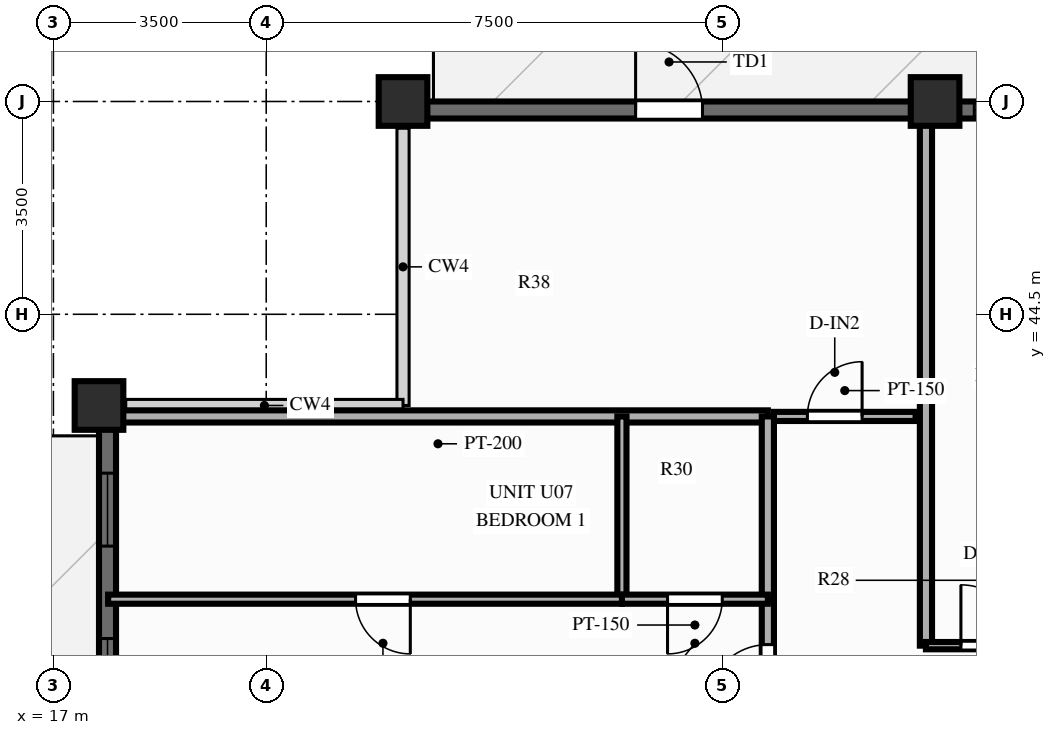
"""IFC4 building model, lengths in metres.
Left out: names, types, materials, properties, quantities, classifications, styles, units other than length and angle.
Written with IfcOpenShell. Run it as: python <this file> out.ifc"""

import sys

from ifc_helpers import new_model, si_unit, direction, frame, frame_2d, origin, origin_2d, place, context, subcontext, project, spatial, rectangle, extrude, source, transform, mapped, element, fill, save


model = new_model("IFC4")
c1 = context("Model", 3, precision=1e-05, world=origin(), true_north=direction((0.0, 1.0)))
c2 = subcontext(c1, "Body", "Model", "MODEL_VIEW")
j1 = project(units=[si_unit("LENGTHUNIT", "METRE"), si_unit("PLANEANGLEUNIT", "RADIAN")], contexts=[c1])
p1 = place(None, origin())
s1 = spatial("IfcSite", under=j1, at=p1, CompositionType="ELEMENT")
p2 = place(p1, origin())
s2 = spatial("IfcBuilding", under=s1, at=p2, CompositionType="ELEMENT")
p3 = place(p2, frame((0.0, 0.0, 186.7)))
s3 = spatial("IfcBuildingStorey", under=s2, at=p3, CompositionType="ELEMENT", Elevation=186.7)
m1 = source(origin(), c2, "Body", "SweptSolid", [
    extrude(rectangle(XDim=0.8, YDim=0.8, at=origin_2d()), origin(), (0.0, 0.0, 1.0), 3.0),
])
for number, where, z_axis, x_axis in (
    (1, (31.5, 48.0, 0.0), (0.0, 0.0, 1.0), (1.0, 0.0, 0.0)),
    (2, (22.75, 48.0, 0.0), (0.0, 0.0, 1.0), (1.0, 0.0, 0.0)),
    (3, (17.75, 43.0, 0.0), (0.0, 0.0, 1.0), (1.0, 0.0, 0.0)),
):
    element("IfcColumn", number, at=place(p3, frame(where, z_axis=z_axis, x_axis=x_axis)), inside=s3, PredefinedType="COLUMN", context=c2, shape_type="MappedRepresentation", body=[
        mapped(m1, transform((0.0, 0.0, 0.0), scale=1.0)),
    ])
p4 = place(p3, frame((22.75, 47.86, 0.0), z_axis=(0.0, 0.0, 1.0), x_axis=(1.0, 0.0, 0.0)))
e4 = element("IfcWall", 4, at=p4, inside=s3, PredefinedType="SOLIDWALL", context=c2, shape_type="SweptSolid", body=[
    extrude(rectangle(XDim=30.5, YDim=0.28, at=frame_2d((15.25, 0.0))), origin(), (0.0, 0.0, 1.0), 2.28),
])
p5 = place(p4, frame((3.825, 0.0, 0.0)))
e5 = element("IfcOpeningElement", 5, at=p5, cuts=e4, PredefinedType="OPENING", context=c2, shape_type="SweptSolid", body=[
    extrude(rectangle(XDim=1.1, YDim=2.15, at=frame_2d((0.55, 1.075))), frame((0.0, 0.152, 0.0), z_axis=(0.0, -1.0, 0.0), x_axis=(1.0, 0.0, 0.0)), (0.0, 0.0, 1.0), 0.304),
])
p6 = place(p4, frame((9.395, 0.0, 0.25)))
e6 = element("IfcOpeningElement", 6, at=p6, cuts=e4, PredefinedType="OPENING", context=c2, shape_type="SweptSolid", body=[
    extrude(rectangle(XDim=0.95, YDim=1.5, at=frame_2d((0.475, 0.75))), frame((0.0, 0.152, 0.0), z_axis=(0.0, -1.0, 0.0), x_axis=(1.0, 0.0, 0.0)), (0.0, 0.0, 1.0), 0.304),
])
p7 = place(p4, frame((11.483, 0.0, 0.25)))
e7 = element("IfcOpeningElement", 7, at=p7, cuts=e4, PredefinedType="OPENING", context=c2, shape_type="SweptSolid", body=[
    extrude(rectangle(XDim=1.2, YDim=1.5, at=frame_2d((0.6, 0.75))), frame((0.0, 0.152, 0.0), z_axis=(0.0, -1.0, 0.0), x_axis=(1.0, 0.0, 0.0)), (0.0, 0.0, 1.0), 0.304),
])
p8 = place(p4, frame((14.383, 0.0, 0.25)))
e8 = element("IfcOpeningElement", 8, at=p8, cuts=e4, PredefinedType="OPENING", context=c2, shape_type="SweptSolid", body=[
    extrude(rectangle(XDim=1.2, YDim=1.5, at=frame_2d((0.6, 0.75))), frame((0.0, 0.152, 0.0), z_axis=(0.0, -1.0, 0.0), x_axis=(1.0, 0.0, 0.0)), (0.0, 0.0, 1.0), 0.304),
])
p9 = place(p4, frame((17.393, 0.0, 0.25)))
e9 = element("IfcOpeningElement", 9, at=p9, cuts=e4, PredefinedType="OPENING", context=c2, shape_type="SweptSolid", body=[
    extrude(rectangle(XDim=1.2, YDim=1.5, at=frame_2d((0.6, 0.75))), frame((0.0, 0.152, 0.0), z_axis=(0.0, -1.0, 0.0), x_axis=(1.0, 0.0, 0.0)), (0.0, 0.0, 1.0), 0.304),
])
p10 = place(p4, frame((19.874, 0.0, 0.25)))
e10 = element("IfcOpeningElement", 10, at=p10, cuts=e4, PredefinedType="OPENING", context=c2, shape_type="SweptSolid", body=[
    extrude(rectangle(XDim=1.2, YDim=1.5, at=frame_2d((0.6, 0.75))), frame((0.0, 0.152, 0.0), z_axis=(0.0, -1.0, 0.0), x_axis=(1.0, 0.0, 0.0)), (0.0, 0.0, 1.0), 0.304),
])
p11 = place(p4, frame((25.525, 0.0, 0.25)))
e11 = element("IfcOpeningElement", 11, at=p11, cuts=e4, PredefinedType="OPENING", context=c2, shape_type="SweptSolid", body=[
    extrude(rectangle(XDim=1.2, YDim=1.5, at=frame_2d((0.6, 0.75))), frame((0.0, 0.152, 0.0), z_axis=(0.0, -1.0, 0.0), x_axis=(1.0, 0.0, 0.0)), (0.0, 0.0, 1.0), 0.304),
])
p12 = place(p3, frame((17.89, 11.0, 0.0), z_axis=(0.0, 0.0, 1.0), x_axis=(0.0, 1.0, 0.0)))
e12 = element("IfcWall", 12, at=p12, inside=s3, PredefinedType="SOLIDWALL", context=c2, shape_type="SweptSolid", body=[
    extrude(rectangle(XDim=32.0, YDim=0.28, at=frame_2d((16.0, 0.0))), origin(), (0.0, 0.0, 1.0), 2.28),
])
p13 = place(p12, frame((0.717, 0.0, 0.25)))
e13 = element("IfcOpeningElement", 13, at=p13, cuts=e12, PredefinedType="OPENING", context=c2, shape_type="SweptSolid", body=[
    extrude(rectangle(XDim=1.2, YDim=1.5, at=frame_2d((0.6, 0.75))), frame((0.0, 0.152, 0.0), z_axis=(0.0, -1.0, 0.0), x_axis=(1.0, 0.0, 0.0)), (0.0, 0.0, 1.0), 0.304),
])
p14 = place(p12, frame((3.139, 0.0, 0.25)))
e14 = element("IfcOpeningElement", 14, at=p14, cuts=e12, PredefinedType="OPENING", context=c2, shape_type="SweptSolid", body=[
    extrude(rectangle(XDim=1.2, YDim=1.5, at=frame_2d((0.6, 0.75))), frame((0.0, 0.152, 0.0), z_axis=(0.0, -1.0, 0.0), x_axis=(1.0, 0.0, 0.0)), (0.0, 0.0, 1.0), 0.304),
])
p15 = place(p12, frame((5.447, 0.0, 0.25)))
e15 = element("IfcOpeningElement", 15, at=p15, cuts=e12, PredefinedType="OPENING", context=c2, shape_type="SweptSolid", body=[
    extrude(rectangle(XDim=0.95, YDim=1.5, at=frame_2d((0.475, 0.75))), frame((0.0, 0.152, 0.0), z_axis=(0.0, -1.0, 0.0), x_axis=(1.0, 0.0, 0.0)), (0.0, 0.0, 1.0), 0.304),
])
p16 = place(p12, frame((8.597, 0.0, 0.25)))
e16 = element("IfcOpeningElement", 16, at=p16, cuts=e12, PredefinedType="OPENING", context=c2, shape_type="SweptSolid", body=[
    extrude(rectangle(XDim=1.2, YDim=1.5, at=frame_2d((0.6, 0.75))), frame((0.0, 0.152, 0.0), z_axis=(0.0, -1.0, 0.0), x_axis=(1.0, 0.0, 0.0)), (0.0, 0.0, 1.0), 0.304),
])
p17 = place(p12, frame((11.05, 0.0, 0.25)))
e17 = element("IfcOpeningElement", 17, at=p17, cuts=e12, PredefinedType="OPENING", context=c2, shape_type="SweptSolid", body=[
    extrude(rectangle(XDim=1.2, YDim=1.5, at=frame_2d((0.6, 0.75))), frame((0.0, 0.152, 0.0), z_axis=(0.0, -1.0, 0.0), x_axis=(1.0, 0.0, 0.0)), (0.0, 0.0, 1.0), 0.304),
])
p18 = place(p12, frame((13.697, 0.0, 0.0)))
e18 = element("IfcOpeningElement", 18, at=p18, cuts=e12, PredefinedType="OPENING", context=c2, shape_type="SweptSolid", body=[
    extrude(rectangle(XDim=1.6, YDim=2.15, at=frame_2d((0.8, 1.075))), frame((0.0, 0.152, 0.0), z_axis=(0.0, -1.0, 0.0), x_axis=(1.0, 0.0, 0.0)), (0.0, 0.0, 1.0), 0.304),
])
p19 = place(p12, frame((16.507, 0.0, 0.25)))
e19 = element("IfcOpeningElement", 19, at=p19, cuts=e12, PredefinedType="OPENING", context=c2, shape_type="SweptSolid", body=[
    extrude(rectangle(XDim=1.2, YDim=1.5, at=frame_2d((0.6, 0.75))), frame((0.0, 0.152, 0.0), z_axis=(0.0, -1.0, 0.0), x_axis=(1.0, 0.0, 0.0)), (0.0, 0.0, 1.0), 0.304),
])
p20 = place(p12, frame((18.959, 0.0, 0.25)))
e20 = element("IfcOpeningElement", 20, at=p20, cuts=e12, PredefinedType="OPENING", context=c2, shape_type="SweptSolid", body=[
    extrude(rectangle(XDim=1.2, YDim=1.5, at=frame_2d((0.6, 0.75))), frame((0.0, 0.152, 0.0), z_axis=(0.0, -1.0, 0.0), x_axis=(1.0, 0.0, 0.0)), (0.0, 0.0, 1.0), 0.304),
])
p21 = place(p12, frame((21.807, 0.0, 0.25)))
e21 = element("IfcOpeningElement", 21, at=p21, cuts=e12, PredefinedType="OPENING", context=c2, shape_type="SweptSolid", body=[
    extrude(rectangle(XDim=1.2, YDim=1.5, at=frame_2d((0.6, 0.75))), frame((0.0, 0.152, 0.0), z_axis=(0.0, -1.0, 0.0), x_axis=(1.0, 0.0, 0.0)), (0.0, 0.0, 1.0), 0.304),
])
p22 = place(p12, frame((26.967, 0.0, 0.25)))
e22 = element("IfcOpeningElement", 22, at=p22, cuts=e12, PredefinedType="OPENING", context=c2, shape_type="SweptSolid", body=[
    extrude(rectangle(XDim=1.2, YDim=1.5, at=frame_2d((0.6, 0.75))), frame((0.0, 0.152, 0.0), z_axis=(0.0, -1.0, 0.0), x_axis=(1.0, 0.0, 0.0)), (0.0, 0.0, 1.0), 0.304),
])
p23 = place(p12, frame((29.687, 0.0, 0.25)))
e23 = element("IfcOpeningElement", 23, at=p23, cuts=e12, PredefinedType="OPENING", context=c2, shape_type="SweptSolid", body=[
    extrude(rectangle(XDim=1.2, YDim=1.5, at=frame_2d((0.6, 0.75))), frame((0.0, 0.152, 0.0), z_axis=(0.0, -1.0, 0.0), x_axis=(1.0, 0.0, 0.0)), (0.0, 0.0, 1.0), 0.304),
])
p24 = place(p3, frame((28.85, 42.82, 0.0), z_axis=(0.0, 0.0, 1.0), x_axis=(1.0, 0.0, 0.0)))
e24 = element("IfcWall", 24, at=p24, inside=s3, PredefinedType="PARTITIONING", context=c2, shape_type="SweptSolid", body=[
    extrude(rectangle(XDim=2.33, YDim=0.15, at=frame_2d((1.165, 0.0))), origin(), (0.0, 0.0, 1.0), 2.79),
])
p25 = place(p24, frame((0.55, 0.0, 0.0)))
e25 = element("IfcOpeningElement", 25, at=p25, cuts=e24, PredefinedType="OPENING", context=c2, shape_type="SweptSolid", body=[
    extrude(rectangle(XDim=0.9, YDim=2.1, at=frame_2d((0.45, 1.05))), frame((0.0, 0.087, 0.0), z_axis=(0.0, -1.0, 0.0), x_axis=(1.0, 0.0, 0.0)), (0.0, 0.0, 1.0), 0.174),
])
p26 = place(p3, frame((31.35, 39.05, 0.0), z_axis=(0.0, 0.0, 1.0), x_axis=(0.0, 1.0, 0.0)))
e26 = element("IfcWall", 26, at=p26, inside=s3, PredefinedType="PARTITIONING", context=c2, shape_type="SweptSolid", body=[
    extrude(rectangle(XDim=8.8, YDim=0.2, at=frame_2d((4.4, 0.0))), origin(), (0.0, 0.0, 1.0), 2.39),
])
p27 = place(p3, frame((31.35, 39.05, 0.0), z_axis=(0.0, 0.0, 1.0), x_axis=(1.0, 0.0, 0.0)))
e27 = element("IfcWall", 27, at=p27, inside=s3, PredefinedType="PARTITIONING", context=c2, shape_type="SweptSolid", body=[
    extrude(rectangle(XDim=2.15, YDim=0.12, at=frame_2d((1.075, 0.0))), origin(), (0.0, 0.0, 1.0), 2.79),
])
p28 = place(p27, frame((0.575, 0.0, 0.0)))
e28 = element("IfcOpeningElement", 28, at=p28, cuts=e27, PredefinedType="OPENING", context=c2, shape_type="SweptSolid", body=[
    extrude(rectangle(XDim=1.0, YDim=2.1, at=frame_2d((0.5, 1.05))), frame((0.0, 0.072, 0.0), z_axis=(0.0, -1.0, 0.0), x_axis=(1.0, 0.0, 0.0)), (0.0, 0.0, 1.0), 0.144),
])
p29 = place(p3, frame((28.75, 42.82, 0.0), z_axis=(0.0, 0.0, 1.0), x_axis=(-1.0, 0.0, 0.0)))
e29 = element("IfcWall", 29, at=p29, inside=s3, PredefinedType="PARTITIONING", context=c2, shape_type="SweptSolid", body=[
    extrude(rectangle(XDim=10.85, YDim=0.2, at=frame_2d((5.425, 0.0))), origin(), (0.0, 0.0, 1.0), 2.79),
])
p30 = place(p3, frame((28.75, 37.32, 0.0), z_axis=(0.0, 0.0, 1.0), x_axis=(0.0, 1.0, 0.0)))
e30 = element("IfcWall", 30, at=p30, inside=s3, PredefinedType="PARTITIONING", context=c2, shape_type="SweptSolid", body=[
    extrude(rectangle(XDim=2.494, YDim=0.2, at=frame_2d((1.247, 0.0))), origin(), (0.0, 0.0, 1.0), 2.79),
])
p31 = place(p30, frame((0.747, 0.0, 0.0)))
e31 = element("IfcOpeningElement", 31, at=p31, cuts=e30, PredefinedType="OPENING", context=c2, shape_type="SweptSolid", body=[
    extrude(rectangle(XDim=1.0, YDim=2.15, at=frame_2d((0.5, 1.075))), frame((0.0, 0.112, 0.0), z_axis=(0.0, -1.0, 0.0), x_axis=(1.0, 0.0, 0.0)), (0.0, 0.0, 1.0), 0.224),
])
p32 = place(p3, frame((28.75, 39.814, 0.0), z_axis=(0.0, 0.0, 1.0), x_axis=(0.0, 1.0, 0.0)))
e32 = element("IfcWall", 32, at=p32, inside=s3, PredefinedType="PARTITIONING", context=c2, shape_type="SweptSolid", body=[
    extrude(rectangle(XDim=3.006, YDim=0.2, at=frame_2d((1.503, 0.0))), origin(), (0.0, 0.0, 1.0), 2.79),
])
p33 = place(p3, frame((26.35, 39.814, 0.0), z_axis=(0.0, 0.0, 1.0), x_axis=(0.0, 1.0, 0.0)))
e33 = element("IfcWall", 33, at=p33, inside=s3, PredefinedType="PARTITIONING", context=c2, shape_type="SweptSolid", body=[
    extrude(rectangle(XDim=3.006, YDim=0.15, at=frame_2d((1.503, 0.0))), origin(), (0.0, 0.0, 1.0), 2.79),
])
p34 = place(p3, frame((28.75, 39.814, 0.0), z_axis=(0.0, 0.0, 1.0), x_axis=(-1.0, 0.0, 0.0)))
e34 = element("IfcWall", 34, at=p34, inside=s3, PredefinedType="PARTITIONING", context=c2, shape_type="SweptSolid", body=[
    extrude(rectangle(XDim=2.4, YDim=0.15, at=frame_2d((1.2, 0.0))), origin(), (0.0, 0.0, 1.0), 2.79),
])
p35 = place(p34, frame((0.75, 0.0, 0.0)))
e35 = element("IfcOpeningElement", 35, at=p35, cuts=e34, PredefinedType="OPENING", context=c2, shape_type="SweptSolid", body=[
    extrude(rectangle(XDim=0.9, YDim=2.1, at=frame_2d((0.45, 1.05))), frame((0.0, 0.087, 0.0), z_axis=(0.0, -1.0, 0.0), x_axis=(1.0, 0.0, 0.0)), (0.0, 0.0, 1.0), 0.174),
])
p36 = place(p3, frame((26.35, 39.814, 0.0), z_axis=(0.0, 0.0, 1.0), x_axis=(-1.0, 0.0, 0.0)))
e36 = element("IfcWall", 36, at=p36, inside=s3, PredefinedType="PARTITIONING", context=c2, shape_type="SweptSolid", body=[
    extrude(rectangle(XDim=8.45, YDim=0.15, at=frame_2d((4.225, 0.0))), origin(), (0.0, 0.0, 1.0), 2.79),
])
p37 = place(p36, frame((3.48, 0.0, 0.0)))
e37 = element("IfcOpeningElement", 37, at=p37, cuts=e36, PredefinedType="OPENING", context=c2, shape_type="SweptSolid", body=[
    extrude(rectangle(XDim=0.9, YDim=2.1, at=frame_2d((0.45, 1.05))), frame((0.0, 0.087, 0.0), z_axis=(0.0, -1.0, 0.0), x_axis=(1.0, 0.0, 0.0)), (0.0, 0.0, 1.0), 0.174),
])
m2 = source(origin(), c2, "Body", "SweptSolid", [
    extrude(rectangle(XDim=1.1, YDim=2.15, at=frame_2d((0.55, 1.075))), frame((0.0, 0.025, 0.0), z_axis=(0.0, -1.0, 0.0), x_axis=(1.0, 0.0, 0.0)), (0.0, 0.0, 1.0), 0.05),
])
p38 = place(p5, origin())
e38 = element("IfcDoor", 38, at=p38, inside=s3, OperationType="SINGLE_SWING_LEFT", PredefinedType="DOOR", context=c2, shape_type="MappedRepresentation", body=[
    mapped(m2, transform((0.0, 0.0, 0.0), scale=1.0)),
])
fill(e5, e38)
m3 = source(origin(), c2, "Body", "SweptSolid", [
    extrude(rectangle(XDim=0.95, YDim=1.5, at=frame_2d((0.475, 0.75))), frame((0.0, 0.03, 0.0), z_axis=(0.0, -1.0, 0.0), x_axis=(1.0, 0.0, 0.0)), (0.0, 0.0, 1.0), 0.06),
])
p39 = place(p6, origin())
e39 = element("IfcWindow", 39, at=p39, inside=s3, PartitioningType="SINGLE_PANEL", PredefinedType="WINDOW", context=c2, shape_type="MappedRepresentation", body=[
    mapped(m3, transform((0.0, 0.0, 0.0), scale=1.0)),
])
fill(e6, e39)
m4 = source(origin(), c2, "Body", "SweptSolid", [
    extrude(rectangle(XDim=1.2, YDim=1.5, at=frame_2d((0.6, 0.75))), frame((0.0, 0.03, 0.0), z_axis=(0.0, -1.0, 0.0), x_axis=(1.0, 0.0, 0.0)), (0.0, 0.0, 1.0), 0.06),
])
p40 = place(p22, origin())
e40 = element("IfcWindow", 40, at=p40, inside=s3, PartitioningType="SINGLE_PANEL", PredefinedType="WINDOW", context=c2, shape_type="MappedRepresentation", body=[
    mapped(m4, transform((0.0, 0.0, 0.0), scale=1.0)),
])
fill(e22, e40)
p41 = place(p23, origin())
e41 = element("IfcWindow", 41, at=p41, inside=s3, PartitioningType="SINGLE_PANEL", PredefinedType="WINDOW", context=c2, shape_type="MappedRepresentation", body=[
    mapped(m4, transform((0.0, 0.0, 0.0), scale=1.0)),
])
fill(e23, e41)
m5 = source(origin(), c2, "Body", "SweptSolid", [
    extrude(rectangle(XDim=0.9, YDim=2.1, at=frame_2d((0.45, 1.05))), frame((0.0, 0.025, 0.0), z_axis=(0.0, -1.0, 0.0), x_axis=(1.0, 0.0, 0.0)), (0.0, 0.0, 1.0), 0.05),
])
p42 = place(p25, origin())
e42 = element("IfcDoor", 42, at=p42, inside=s3, OperationType="SINGLE_SWING_RIGHT", PredefinedType="DOOR", context=c2, shape_type="MappedRepresentation", body=[
    mapped(m5, transform((0.0, 0.0, 0.0), scale=1.0)),
])
fill(e25, e42)
m6 = source(origin(), c2, "Body", "SweptSolid", [
    extrude(rectangle(XDim=1.0, YDim=2.1, at=frame_2d((0.5, 1.05))), frame((0.0, 0.025, 0.0), z_axis=(0.0, -1.0, 0.0), x_axis=(1.0, 0.0, 0.0)), (0.0, 0.0, 1.0), 0.05),
])
p43 = place(p28, origin())
e43 = element("IfcDoor", 43, at=p43, inside=s3, OperationType="SINGLE_SWING_LEFT", PredefinedType="DOOR", context=c2, shape_type="MappedRepresentation", body=[
    mapped(m6, transform((0.0, 0.0, 0.0), scale=1.0)),
])
fill(e28, e43)
m7 = source(origin(), c2, "Body", "SweptSolid", [
    extrude(rectangle(XDim=1.0, YDim=2.15, at=frame_2d((0.5, 1.075))), frame((0.0, 0.025, 0.0), z_axis=(0.0, -1.0, 0.0), x_axis=(1.0, 0.0, 0.0)), (0.0, 0.0, 1.0), 0.05),
])
p44 = place(p31, origin())
e44 = element("IfcDoor", 44, at=p44, inside=s3, OperationType="SINGLE_SWING_LEFT", PredefinedType="DOOR", context=c2, shape_type="MappedRepresentation", body=[
    mapped(m7, transform((0.0, 0.0, 0.0), scale=1.0)),
])
fill(e31, e44)
p45 = place(p35, origin())
e45 = element("IfcDoor", 45, at=p45, inside=s3, OperationType="SINGLE_SWING_RIGHT", PredefinedType="DOOR", context=c2, shape_type="MappedRepresentation", body=[
    mapped(m5, transform((0.0, 0.0, 0.0), scale=1.0)),
])
fill(e35, e45)
p46 = place(p37, origin())
e46 = element("IfcDoor", 46, at=p46, inside=s3, OperationType="SINGLE_SWING_LEFT", PredefinedType="DOOR", context=c2, shape_type="MappedRepresentation", body=[
    mapped(m5, transform((0.0, 0.0, 0.0), scale=1.0)),
])
fill(e37, e46)
save(model, sys.argv[1])
